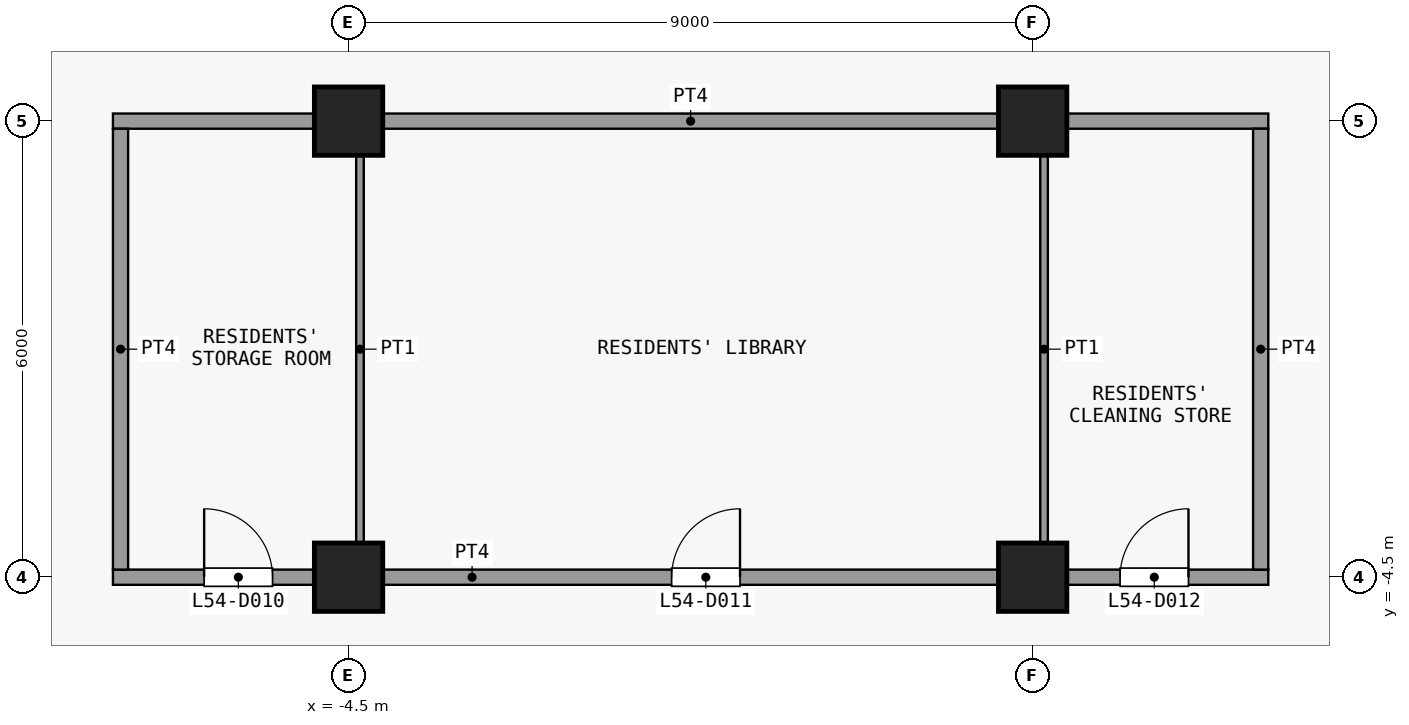
"""IFC4 building model, lengths in metres.
Left out: names, types, materials, properties, quantities, classifications, styles, units other than length and angle.
Written with IfcOpenShell. Run it as: python <this file> out.ifc"""

import sys

from ifc_helpers import new_model, si_unit, direction, frame, frame_2d, origin, origin_2d, place, context, subcontext, project, spatial, rectangle, extrude, element, fill, save


model = new_model("IFC4")
c1 = context("Model", 3, precision=1e-05, world=origin(), true_north=direction((0.0, 1.0)))
c2 = subcontext(c1, "Body", "Model", "MODEL_VIEW")
j1 = project(units=[si_unit("LENGTHUNIT", "METRE"), si_unit("PLANEANGLEUNIT", "RADIAN")], contexts=[c1])
p1 = place(None, origin())
s1 = spatial("IfcSite", under=j1, at=p1, CompositionType="ELEMENT")
p2 = place(p1, origin())
s2 = spatial("IfcBuilding", under=s1, at=p2, CompositionType="ELEMENT")
p3 = place(p2, frame((0.0, 0.0, 215.9)))
s3 = spatial("IfcBuildingStorey", under=s2, at=p3, CompositionType="ELEMENT", Elevation=215.9)
for number, where, z_axis, x_axis in (
    (1, (-4.5, -4.5, 0.0), (0.0, 0.0, 1.0), (1.0, 0.0, 0.0)),
    (2, (-4.5, 1.5, 0.0), (0.0, 0.0, 1.0), (1.0, 0.0, 0.0)),
    (3, (4.5, -4.5, 0.0), (0.0, 0.0, 1.0), (1.0, 0.0, 0.0)),
    (4, (4.5, 1.5, 0.0), (0.0, 0.0, 1.0), (1.0, 0.0, 0.0)),
):
    element("IfcColumn", number, at=place(p3, frame(where, z_axis=z_axis, x_axis=x_axis)), inside=s3, PredefinedType="COLUMN", context=c2, shape_type="SweptSolid", body=[
        extrude(rectangle(XDim=0.9, YDim=0.9, at=origin_2d()), origin(), (0.0, 0.0, 1.0), 3.6),
    ])
p4 = place(p3, frame((-7.6, -4.5, 0.0), z_axis=(0.0, 0.0, 1.0), x_axis=(1.0, 0.0, 0.0)))
e5 = element("IfcWall", 5, at=p4, inside=s3, PredefinedType="PARTITIONING", context=c2, shape_type="SweptSolid", body=[
    extrude(rectangle(XDim=15.2, YDim=0.2, at=frame_2d((7.6, 0.0))), origin(), (0.0, 0.0, 1.0), 3.3),
])
p5 = place(p4, frame((1.2, 0.0, 0.0)))
e6 = element("IfcOpeningElement", 6, at=p5, cuts=e5, PredefinedType="OPENING", context=c2, shape_type="SweptSolid", body=[
    extrude(rectangle(XDim=0.9, YDim=2.1, at=frame_2d((0.45, 1.05))), frame((0.0, 0.11, 0.0), z_axis=(0.0, -1.0, 0.0), x_axis=(1.0, 0.0, 0.0)), (0.0, 0.0, 1.0), 0.22),
])
p6 = place(p4, frame((7.35, 0.0, 0.0)))
e7 = element("IfcOpeningElement", 7, at=p6, cuts=e5, PredefinedType="OPENING", context=c2, shape_type="SweptSolid", body=[
    extrude(rectangle(XDim=0.9, YDim=2.1, at=frame_2d((0.45, 1.05))), frame((0.0, 0.11, 0.0), z_axis=(0.0, -1.0, 0.0), x_axis=(1.0, 0.0, 0.0)), (0.0, 0.0, 1.0), 0.22),
])
p7 = place(p4, frame((13.25, 0.0, 0.0)))
e8 = element("IfcOpeningElement", 8, at=p7, cuts=e5, PredefinedType="OPENING", context=c2, shape_type="SweptSolid", body=[
    extrude(rectangle(XDim=0.9, YDim=2.1, at=frame_2d((0.45, 1.05))), frame((0.0, 0.11, 0.0), z_axis=(0.0, -1.0, 0.0), x_axis=(1.0, 0.0, 0.0)), (0.0, 0.0, 1.0), 0.22),
])
p8 = place(p3, frame((-7.6, 1.5, 0.0), z_axis=(0.0, 0.0, 1.0), x_axis=(1.0, 0.0, 0.0)))
e9 = element("IfcWall", 9, at=p8, inside=s3, PredefinedType="PARTITIONING", context=c2, shape_type="SweptSolid", body=[
    extrude(rectangle(XDim=15.2, YDim=0.2, at=frame_2d((7.6, 0.0))), origin(), (0.0, 0.0, 1.0), 3.3),
])
p9 = place(p3, frame((-7.5, -4.4, 0.0), z_axis=(0.0, 0.0, 1.0), x_axis=(0.0, 1.0, 0.0)))
e10 = element("IfcWall", 10, at=p9, inside=s3, PredefinedType="PARTITIONING", context=c2, shape_type="SweptSolid", body=[
    extrude(rectangle(XDim=5.8, YDim=0.2, at=frame_2d((2.9, 0.0))), origin(), (0.0, 0.0, 1.0), 3.3),
])
for number, where, z_axis, x_axis in (
    (11, (-4.35, -4.4, 0.0), (0.0, 0.0, 1.0), (0.0, 1.0, 0.0)),
    (12, (4.65, -4.4, 0.0), (0.0, 0.0, 1.0), (0.0, 1.0, 0.0)),
):
    element("IfcWall", number, at=place(p3, frame(where, z_axis=z_axis, x_axis=x_axis)), inside=s3, PredefinedType="PARTITIONING", context=c2, shape_type="SweptSolid", body=[
        extrude(rectangle(XDim=5.8, YDim=0.1, at=frame_2d((2.9, 0.0))), origin(), (0.0, 0.0, 1.0), 3.3),
    ])
p10 = place(p3, frame((7.5, -4.4, 0.0), z_axis=(0.0, 0.0, 1.0), x_axis=(0.0, 1.0, 0.0)))
e13 = element("IfcWall", 13, at=p10, inside=s3, PredefinedType="PARTITIONING", context=c2, shape_type="SweptSolid", body=[
    extrude(rectangle(XDim=5.8, YDim=0.2, at=frame_2d((2.9, 0.0))), origin(), (0.0, 0.0, 1.0), 3.3),
])
p11 = place(p5, origin())
e14 = element("IfcDoor", 14, at=p11, inside=s3, OperationType="SINGLE_SWING_RIGHT", PredefinedType="DOOR", context=c2, shape_type="SweptSolid", body=[
    extrude(rectangle(XDim=0.9, YDim=2.1, at=frame_2d((0.45, 1.05))), frame((0.0, 0.025, 0.0), z_axis=(0.0, -1.0, 0.0), x_axis=(1.0, 0.0, 0.0)), (0.0, 0.0, 1.0), 0.05),
])
fill(e6, e14)
p12 = place(p6, origin())
e15 = element("IfcDoor", 15, at=p12, inside=s3, OperationType="SINGLE_SWING_LEFT", PredefinedType="DOOR", context=c2, shape_type="SweptSolid", body=[
    extrude(rectangle(XDim=0.9, YDim=2.1, at=frame_2d((0.45, 1.05))), frame((0.0, 0.025, 0.0), z_axis=(0.0, -1.0, 0.0), x_axis=(1.0, 0.0, 0.0)), (0.0, 0.0, 1.0), 0.05),
])
fill(e7, e15)
p13 = place(p7, origin())
e16 = element("IfcDoor", 16, at=p13, inside=s3, OperationType="SINGLE_SWING_LEFT", PredefinedType="DOOR", context=c2, shape_type="SweptSolid", body=[
    extrude(rectangle(XDim=0.9, YDim=2.1, at=frame_2d((0.45, 1.05))), frame((0.0, 0.025, 0.0), z_axis=(0.0, -1.0, 0.0), x_axis=(1.0, 0.0, 0.0)), (0.0, 0.0, 1.0), 0.05),
])
fill(e8, e16)
save(model, sys.argv[1])
